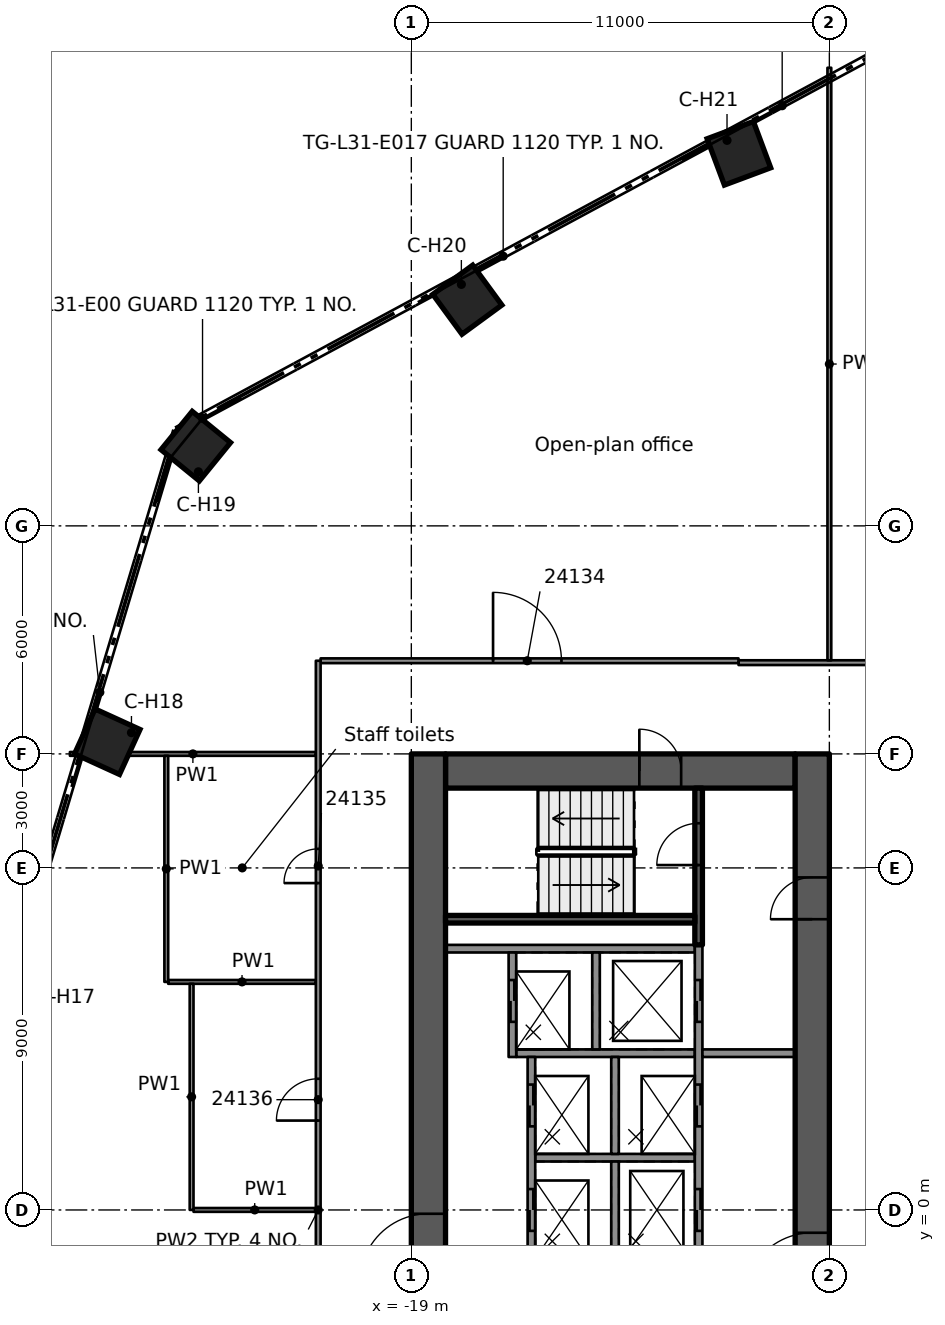
"""IFC4 building model, lengths in metres.
Left out: names, types, materials, properties, quantities, classifications, styles, units other than length and angle.
Written with IfcOpenShell. Run it as: python <this file> out.ifc"""

import sys

from ifc_helpers import new_model, si_unit, direction, frame, frame_2d, origin, origin_2d, place, context, subcontext, project, spatial, rectangle, extrude, element, fill, save


model = new_model("IFC4")
c1 = context("Model", 3, precision=1e-05, world=origin(), true_north=direction((0.0, 1.0)))
c2 = subcontext(c1, "Body", "Model", "MODEL_VIEW")
j1 = project(units=[si_unit("LENGTHUNIT", "METRE"), si_unit("PLANEANGLEUNIT", "RADIAN")], contexts=[c1])
p1 = place(None, origin())
s1 = spatial("IfcSite", under=j1, at=p1, CompositionType="ELEMENT")
p2 = place(p1, origin())
s2 = spatial("IfcBuilding", under=s1, at=p2, CompositionType="ELEMENT")
p3 = place(p2, frame((0.0, 0.0, 123.7)))
s3 = spatial("IfcBuildingStorey", under=s2, at=p3, CompositionType="ELEMENT", Elevation=123.7)
p4 = place(p3, frame((-18.1, 11.55, 0.0), z_axis=(0.0, 0.0, 1.0), x_axis=(1.0, 0.0, 0.0)))
e1 = element("IfcWall", 1, at=p4, inside=s3, PredefinedType="SHEAR", context=c2, shape_type="SweptSolid", body=[
    extrude(rectangle(XDim=9.2, YDim=0.9, at=frame_2d((4.6, 0.0))), origin(), (0.0, 0.0, 1.0), 3.5),
])
p5 = place(p4, frame((5.1, 0.0, 0.0)))
e2 = element("IfcOpeningElement", 2, at=p5, cuts=e1, PredefinedType="OPENING", context=c2, shape_type="SweptSolid", body=[
    extrude(rectangle(XDim=1.1, YDim=2.1, at=frame_2d((0.55, 1.05))), frame((0.0, 0.46, 0.0), z_axis=(0.0, -1.0, 0.0), x_axis=(1.0, 0.0, 0.0)), (0.0, 0.0, 1.0), 0.92),
])
p6 = place(p3, frame((-18.55, -12.0, 0.0), z_axis=(0.0, 0.0, 1.0), x_axis=(0.0, 1.0, 0.0)))
e3 = element("IfcWall", 3, at=p6, inside=s3, PredefinedType="SHEAR", context=c2, shape_type="SweptSolid", body=[
    extrude(rectangle(XDim=24.0, YDim=0.9, at=frame_2d((12.0, 0.0))), origin(), (0.0, 0.0, 1.0), 3.5),
])
p7 = place(p6, frame((10.1, 0.0, 0.0)))
e4 = element("IfcOpeningElement", 4, at=p7, cuts=e3, PredefinedType="OPENING", context=c2, shape_type="SweptSolid", body=[
    extrude(rectangle(XDim=1.8, YDim=2.1, at=frame_2d((0.9, 1.05))), frame((0.0, 0.46, 0.0), z_axis=(0.0, -1.0, 0.0), x_axis=(1.0, 0.0, 0.0)), (0.0, 0.0, 1.0), 0.92),
])
p8 = place(p3, frame((-8.45, -12.0, 0.0), z_axis=(0.0, 0.0, 1.0), x_axis=(0.0, 1.0, 0.0)))
e5 = element("IfcWall", 5, at=p8, inside=s3, PredefinedType="SHEAR", context=c2, shape_type="SweptSolid", body=[
    extrude(rectangle(XDim=24.0, YDim=0.9, at=frame_2d((12.0, 0.0))), origin(), (0.0, 0.0, 1.0), 3.5),
])
p9 = place(p8, frame((9.6, 0.0, 0.0)))
e6 = element("IfcOpeningElement", 6, at=p9, cuts=e5, PredefinedType="OPENING", context=c2, shape_type="SweptSolid", body=[
    extrude(rectangle(XDim=1.8, YDim=2.1, at=frame_2d((0.9, 1.05))), frame((0.0, 0.46, 0.0), z_axis=(0.0, -1.0, 0.0), x_axis=(1.0, 0.0, 0.0)), (0.0, 0.0, 1.0), 0.92),
])
p10 = place(p8, frame((19.65, 0.0, 0.0)))
e7 = element("IfcOpeningElement", 7, at=p10, cuts=e5, PredefinedType="OPENING", context=c2, shape_type="SweptSolid", body=[
    extrude(rectangle(XDim=1.1, YDim=2.1, at=frame_2d((0.55, 1.05))), frame((0.0, 0.46, 0.0), z_axis=(0.0, -1.0, 0.0), x_axis=(1.0, 0.0, 0.0)), (0.0, 0.0, 1.0), 0.92),
])
for number, where, z_axis, x_axis in (
    (8, (-27.001, 12.321, 0.0), (0.0, 0.0, 1.0), (-0.91, 0.415, 0.0)),
    (9, (-24.672, 20.098, 0.0), (0.0, 0.0, 1.0), (-0.775, 0.632, 0.0)),
    (10, (-17.526, 23.951, 0.0), (0.0, 0.0, 1.0), (-0.591, 0.807, 0.0)),
    (11, (-10.38, 27.804, 0.0), (0.0, 0.0, 1.0), (-0.35, 0.937, 0.0)),
):
    element("IfcColumn", number, at=place(p3, frame(where, z_axis=z_axis, x_axis=x_axis)), inside=s3, PredefinedType="COLUMN", context=c2, shape_type="SweptSolid", body=[
        extrude(rectangle(XDim=1.3, YDim=1.3, at=origin_2d()), origin(), (0.0, 0.0, 1.0), 3.5),
    ])
p11 = place(p3, frame((-11.54, 6.875, 0.0), z_axis=(0.0, 0.0, 1.0), x_axis=(-1.0, 0.0, 0.0)))
e12 = element("IfcWall", 12, at=p11, inside=s3, PredefinedType="SOLIDWALL", context=c2, shape_type="SweptSolid", body=[
    extrude(rectangle(XDim=6.56, YDim=0.2, at=frame_2d((3.28, 0.0))), origin(), (0.0, 0.0, 1.0), 3.09),
])
p12 = place(p3, frame((-11.54, 1.375, 0.0), z_axis=(0.0, 0.0, 1.0), x_axis=(-1.0, 0.0, 0.0)))
e13 = element("IfcWall", 13, at=p12, inside=s3, PredefinedType="SOLIDWALL", context=c2, shape_type="SweptSolid", body=[
    extrude(rectangle(XDim=4.2, YDim=0.2, at=frame_2d((2.1, 0.0))), origin(), (0.0, 0.0, 1.0), 3.09),
])
p13 = place(p3, frame((-11.54, 4.125, 0.0), z_axis=(0.0, 0.0, 1.0), x_axis=(-1.0, 0.0, 0.0)))
e14 = element("IfcWall", 14, at=p13, inside=s3, PredefinedType="SOLIDWALL", context=c2, shape_type="SweptSolid", body=[
    extrude(rectangle(XDim=4.7, YDim=0.2, at=frame_2d((2.35, 0.0))), origin(), (0.0, 0.0, 1.0), 3.09),
])
p14 = place(p3, frame((-11.44, -6.975, 0.0), z_axis=(0.0, 0.0, 1.0), x_axis=(0.0, 1.0, 0.0)))
e15 = element("IfcWall", 15, at=p14, inside=s3, PredefinedType="SOLIDWALL", context=c2, shape_type="SweptSolid", body=[
    extrude(rectangle(XDim=13.95, YDim=0.2, at=frame_2d((6.975, 0.0))), origin(), (0.0, 0.0, 1.0), 3.09),
])
p15 = place(p14, frame((6.425, 0.0, 0.0)))
e16 = element("IfcOpeningElement", 16, at=p15, cuts=e15, PredefinedType="OPENING", context=c2, shape_type="SweptSolid", body=[
    extrude(rectangle(XDim=1.1, YDim=2.1, at=frame_2d((0.55, 1.05))), frame((0.0, 0.11, 0.0), z_axis=(0.0, -1.0, 0.0), x_axis=(1.0, 0.0, 0.0)), (0.0, 0.0, 1.0), 0.22),
])
p16 = place(p14, frame((9.175, 0.0, 0.0)))
e17 = element("IfcOpeningElement", 17, at=p16, cuts=e15, PredefinedType="OPENING", context=c2, shape_type="SweptSolid", body=[
    extrude(rectangle(XDim=1.1, YDim=2.1, at=frame_2d((0.55, 1.05))), frame((0.0, 0.11, 0.0), z_axis=(0.0, -1.0, 0.0), x_axis=(1.0, 0.0, 0.0)), (0.0, 0.0, 1.0), 0.22),
])
p17 = place(p14, frame((11.925, 0.0, 0.0)))
e18 = element("IfcOpeningElement", 18, at=p17, cuts=e15, PredefinedType="OPENING", context=c2, shape_type="SweptSolid", body=[
    extrude(rectangle(XDim=1.1, YDim=2.1, at=frame_2d((0.55, 1.05))), frame((0.0, 0.11, 0.0), z_axis=(0.0, -1.0, 0.0), x_axis=(1.0, 0.0, 0.0)), (0.0, 0.0, 1.0), 0.22),
])
p18 = place(p14, frame((1.075, 0.0, 0.0)))
e19 = element("IfcOpeningElement", 19, at=p18, cuts=e15, PredefinedType="OPENING", context=c2, shape_type="SweptSolid", body=[
    extrude(rectangle(XDim=0.8, YDim=2.1, at=frame_2d((0.4, 1.05))), frame((0.0, 0.11, 0.0), z_axis=(0.0, -1.0, 0.0), x_axis=(1.0, 0.0, 0.0)), (0.0, 0.0, 1.0), 0.22),
])
for number, where, z_axis, x_axis in (
    (20, (-13.64, -1.275, 0.0), (0.0, 0.0, 1.0), (0.0, 1.0, 0.0)),
    (21, (-13.64, 1.475, 0.0), (0.0, 0.0, 1.0), (0.0, 1.0, 0.0)),
    (22, (-14.14, 4.225, 0.0), (0.0, 0.0, 1.0), (0.0, 1.0, 0.0)),
):
    element("IfcWall", number, at=place(p3, frame(where, z_axis=z_axis, x_axis=x_axis)), inside=s3, PredefinedType="SOLIDWALL", context=c2, shape_type="SweptSolid", body=[
        extrude(rectangle(XDim=2.55, YDim=0.2, at=frame_2d((1.275, 0.0))), origin(), (0.0, 0.0, 1.0), 3.09),
    ])
p19 = place(p3, frame((-15.84, -4.025, 0.0), z_axis=(0.0, 0.0, 1.0), x_axis=(0.0, 1.0, 0.0)))
e23 = element("IfcWall", 23, at=p19, inside=s3, PredefinedType="SOLIDWALL", context=c2, shape_type="SweptSolid", body=[
    extrude(rectangle(XDim=8.05, YDim=0.2, at=frame_2d((4.025, 0.0))), origin(), (0.0, 0.0, 1.0), 3.09),
])
p20 = place(p19, frame((3.475, 0.0, 0.0)))
e24 = element("IfcOpeningElement", 24, at=p20, cuts=e23, PredefinedType="OPENING", context=c2, shape_type="SweptSolid", body=[
    extrude(rectangle(XDim=1.1, YDim=2.1, at=frame_2d((0.55, 1.05))), frame((0.0, 0.11, 0.0), z_axis=(0.0, -1.0, 0.0), x_axis=(1.0, 0.0, 0.0)), (0.0, 0.0, 1.0), 0.22),
])
p21 = place(p19, frame((6.225, 0.0, 0.0)))
e25 = element("IfcOpeningElement", 25, at=p21, cuts=e23, PredefinedType="OPENING", context=c2, shape_type="SweptSolid", body=[
    extrude(rectangle(XDim=1.1, YDim=2.1, at=frame_2d((0.55, 1.05))), frame((0.0, 0.11, 0.0), z_axis=(0.0, -1.0, 0.0), x_axis=(1.0, 0.0, 0.0)), (0.0, 0.0, 1.0), 0.22),
])
p22 = place(p3, frame((-16.34, 4.025, 0.0), z_axis=(0.0, 0.0, 1.0), x_axis=(0.0, 1.0, 0.0)))
e26 = element("IfcWall", 26, at=p22, inside=s3, PredefinedType="SOLIDWALL", context=c2, shape_type="SweptSolid", body=[
    extrude(rectangle(XDim=2.75, YDim=0.2, at=frame_2d((1.375, 0.0))), origin(), (0.0, 0.0, 1.0), 3.09),
])
p23 = place(p22, frame((0.925, 0.0, 0.0)))
e27 = element("IfcOpeningElement", 27, at=p23, cuts=e26, PredefinedType="OPENING", context=c2, shape_type="SweptSolid", body=[
    extrude(rectangle(XDim=1.1, YDim=2.1, at=frame_2d((0.55, 1.05))), frame((0.0, 0.11, 0.0), z_axis=(0.0, -1.0, 0.0), x_axis=(1.0, 0.0, 0.0)), (0.0, 0.0, 1.0), 0.22),
])
p24 = place(p3, frame((-11.44, 6.975, 0.0), z_axis=(0.0, 0.0, 1.0), x_axis=(0.0, 1.0, 0.0)))
e28 = element("IfcWall", 28, at=p24, inside=s3, PredefinedType="SOLIDWALL", context=c2, shape_type="SweptSolid", body=[
    extrude(rectangle(XDim=4.125, YDim=0.2, at=frame_2d((2.062, 0.0))), origin(), (0.0, 0.0, 1.0), 3.09),
])
p25 = place(p24, frame((2.1, 0.0, 0.0)))
e29 = element("IfcOpeningElement", 29, at=p25, cuts=e28, PredefinedType="OPENING", context=c2, shape_type="SweptSolid", body=[
    extrude(rectangle(XDim=1.1, YDim=2.1, at=frame_2d((0.55, 1.05))), frame((0.0, 0.11, 0.0), z_axis=(0.0, -1.0, 0.0), x_axis=(1.0, 0.0, 0.0)), (0.0, 0.0, 1.0), 0.22),
])
p26 = place(p3, frame((-11.54, 7.65, 0.0), z_axis=(0.0, 0.0, 1.0), x_axis=(-1.0, 0.0, 0.0)))
e30 = element("IfcWall", 30, at=p26, inside=s3, PredefinedType="SOLIDWALL", context=c2, shape_type="SweptSolid", body=[
    extrude(rectangle(XDim=6.56, YDim=0.2, at=frame_2d((3.28, 0.0))), origin(), (0.0, 0.0, 1.0), 3.09),
])
p27 = place(p3, frame((-8.9, 4.125, 0.0), z_axis=(0.0, 0.0, 1.0), x_axis=(-1.0, 0.0, 0.0)))
e31 = element("IfcWall", 31, at=p27, inside=s3, PredefinedType="PARTITIONING", context=c2, shape_type="SweptSolid", body=[
    extrude(rectangle(XDim=2.44, YDim=0.2, at=frame_2d((1.22, 0.0))), origin(), (0.0, 0.0, 1.0), 3.09),
])
p28 = place(p3, frame((-24.731, 0.001, 0.0), z_axis=(0.0, 0.0, 1.0), x_axis=(1.0, 0.0, 0.0)))
e32 = element("IfcWall", 32, at=p28, inside=s3, PredefinedType="PARTITIONING", context=c2, shape_type="SweptSolid", body=[
    extrude(rectangle(XDim=3.219, YDim=0.1, at=frame_2d((1.609, 0.0))), origin(), (0.0, 0.0, 1.0), 3.08),
])
p29 = place(p3, frame((-25.398, 6.001, 0.0), z_axis=(0.0, 0.0, 1.0), x_axis=(1.0, 0.0, 0.0)))
e33 = element("IfcWall", 33, at=p29, inside=s3, PredefinedType="PARTITIONING", context=c2, shape_type="SweptSolid", body=[
    extrude(rectangle(XDim=3.886, YDim=0.1, at=frame_2d((1.943, 0.0))), origin(), (0.0, 0.0, 1.0), 3.08),
])
p30 = place(p3, frame((-27.984, 12.0, 0.0), z_axis=(0.0, 0.0, 1.0), x_axis=(1.0, 0.0, 0.0)))
e34 = element("IfcWall", 34, at=p30, inside=s3, PredefinedType="PARTITIONING", context=c2, shape_type="SweptSolid", body=[
    extrude(rectangle(XDim=6.472, YDim=0.1, at=frame_2d((3.236, 0.0))), origin(), (0.0, 0.0, 1.0), 3.08),
])
p31 = place(p3, frame((-10.39, 14.401, 0.0), z_axis=(0.0, 0.0, 1.0), x_axis=(1.0, 0.0, 0.0)))
e35 = element("IfcWall", 35, at=p31, inside=s3, PredefinedType="PARTITIONING", context=c2, shape_type="SweptSolid", body=[
    extrude(rectangle(XDim=20.781, YDim=0.125, at=frame_2d((10.391, 0.0))), origin(), (0.0, 0.0, 1.0), 3.08),
])
p32 = place(p31, frame((18.99, 0.0, 0.0)))
e36 = element("IfcOpeningElement", 36, at=p32, cuts=e35, PredefinedType="OPENING", context=c2, shape_type="SweptSolid", body=[
    extrude(rectangle(XDim=1.1, YDim=2.1, at=frame_2d((0.55, 1.05))), frame((0.0, 0.073, 0.0), z_axis=(0.0, -1.0, 0.0), x_axis=(1.0, 0.0, 0.0)), (0.0, 0.0, 1.0), 0.145),
])
p33 = place(p31, frame((13.49, 0.0, 0.0)))
e37 = element("IfcOpeningElement", 37, at=p33, cuts=e35, PredefinedType="OPENING", context=c2, shape_type="SweptSolid", body=[
    extrude(rectangle(XDim=1.8, YDim=2.1, at=frame_2d((0.9, 1.05))), frame((0.0, 0.073, 0.0), z_axis=(0.0, -1.0, 0.0), x_axis=(1.0, 0.0, 0.0)), (0.0, 0.0, 1.0), 0.145),
])
p34 = place(p31, frame((5.49, 0.0, 0.0)))
e38 = element("IfcOpeningElement", 38, at=p34, cuts=e35, PredefinedType="OPENING", context=c2, shape_type="SweptSolid", body=[
    extrude(rectangle(XDim=1.8, YDim=2.1, at=frame_2d((0.9, 1.05))), frame((0.0, 0.073, 0.0), z_axis=(0.0, -1.0, 0.0), x_axis=(1.0, 0.0, 0.0)), (0.0, 0.0, 1.0), 0.145),
])
p35 = place(p3, frame((-21.387, 14.451, 0.0), z_axis=(0.0, 0.0, 1.0), x_axis=(1.0, 0.0, 0.0)))
e39 = element("IfcWall", 39, at=p35, inside=s3, PredefinedType="PARTITIONING", context=c2, shape_type="SweptSolid", body=[
    extrude(rectangle(XDim=10.996, YDim=0.125, at=frame_2d((5.498, 0.0))), origin(), (0.0, 0.0, 1.0), 3.08),
])
p36 = place(p35, frame((4.538, 0.0, 0.0)))
e40 = element("IfcOpeningElement", 40, at=p36, cuts=e39, PredefinedType="OPENING", context=c2, shape_type="SweptSolid", body=[
    extrude(rectangle(XDim=1.8, YDim=2.1, at=frame_2d((0.9, 1.05))), frame((0.0, 0.073, 0.0), z_axis=(0.0, -1.0, 0.0), x_axis=(1.0, 0.0, 0.0)), (0.0, 0.0, 1.0), 0.145),
])
p37 = place(p3, frame((-8.0, 14.463, 0.0), z_axis=(0.0, 0.0, 1.0), x_axis=(0.0, 1.0, 0.0)))
e41 = element("IfcWall", 41, at=p37, inside=s3, PredefinedType="PARTITIONING", context=c2, shape_type="SweptSolid", body=[
    extrude(rectangle(XDim=15.591, YDim=0.1, at=frame_2d((7.795, 0.0))), origin(), (0.0, 0.0, 1.0), 3.08),
])
p38 = place(p3, frame((-21.45, -14.451, 0.0), z_axis=(0.0, 0.0, 1.0), x_axis=(0.0, 1.0, 0.0)))
e42 = element("IfcWall", 42, at=p38, inside=s3, PredefinedType="PARTITIONING", context=c2, shape_type="SweptSolid", body=[
    extrude(rectangle(XDim=28.902, YDim=0.125, at=frame_2d((14.451, 0.0))), origin(), (0.0, 0.0, 1.0), 3.08),
])
p39 = place(p38, frame((8.051, 0.0, 0.0)))
e43 = element("IfcOpeningElement", 43, at=p39, cuts=e42, PredefinedType="OPENING", context=c2, shape_type="SweptSolid", body=[
    extrude(rectangle(XDim=0.9, YDim=2.1, at=frame_2d((0.45, 1.05))), frame((0.0, 0.073, 0.0), z_axis=(0.0, -1.0, 0.0), x_axis=(1.0, 0.0, 0.0)), (0.0, 0.0, 1.0), 0.145),
])
p40 = place(p38, frame((23.052, 0.0, 0.0)))
e44 = element("IfcOpeningElement", 44, at=p40, cuts=e42, PredefinedType="OPENING", context=c2, shape_type="SweptSolid", body=[
    extrude(rectangle(XDim=0.9, YDim=2.1, at=frame_2d((0.45, 1.05))), frame((0.0, 0.073, 0.0), z_axis=(0.0, -1.0, 0.0), x_axis=(1.0, 0.0, 0.0)), (0.0, 0.0, 1.0), 0.145),
])
p41 = place(p38, frame((16.803, 0.0, 0.0)))
e45 = element("IfcOpeningElement", 45, at=p41, cuts=e42, PredefinedType="OPENING", context=c2, shape_type="SweptSolid", body=[
    extrude(rectangle(XDim=1.1, YDim=2.1, at=frame_2d((0.55, 1.05))), frame((0.0, 0.073, 0.0), z_axis=(0.0, -1.0, 0.0), x_axis=(1.0, 0.0, 0.0)), (0.0, 0.0, 1.0), 0.145),
])
for number, where, z_axis, x_axis in (
    (46, (-24.782, 0.002, 0.0), (0.0, 0.0, 1.0), (0.0, 1.0, 0.0)),
    (47, (-25.448, 6.001, 0.0), (0.0, 0.0, 1.0), (0.0, 1.0, 0.0)),
):
    element("IfcWall", number, at=place(p3, frame(where, z_axis=z_axis, x_axis=x_axis)), inside=s3, PredefinedType="PARTITIONING", context=c2, shape_type="SweptSolid", body=[
        extrude(rectangle(XDim=5.949, YDim=0.1, at=frame_2d((2.975, 0.0))), origin(), (0.0, 0.0, 1.0), 3.08),
    ])
p42 = place(p15, origin())
e48 = element("IfcDoor", 48, at=p42, inside=s3, OperationType="DOUBLE_DOOR_SLIDING", PredefinedType="DOOR", context=c2, shape_type="SweptSolid", body=[
    extrude(rectangle(XDim=1.1, YDim=2.1, at=frame_2d((0.55, 1.05))), frame((0.0, 0.025, 0.0), z_axis=(0.0, -1.0, 0.0), x_axis=(1.0, 0.0, 0.0)), (0.0, 0.0, 1.0), 0.05),
])
fill(e16, e48)
p43 = place(p20, origin())
e49 = element("IfcDoor", 49, at=p43, inside=s3, OperationType="DOUBLE_DOOR_SLIDING", PredefinedType="DOOR", context=c2, shape_type="SweptSolid", body=[
    extrude(rectangle(XDim=1.1, YDim=2.1, at=frame_2d((0.55, 1.05))), frame((0.0, 0.025, 0.0), z_axis=(0.0, -1.0, 0.0), x_axis=(1.0, 0.0, 0.0)), (0.0, 0.0, 1.0), 0.05),
])
fill(e24, e49)
p44 = place(p16, origin())
e50 = element("IfcDoor", 50, at=p44, inside=s3, OperationType="DOUBLE_DOOR_SLIDING", PredefinedType="DOOR", context=c2, shape_type="SweptSolid", body=[
    extrude(rectangle(XDim=1.1, YDim=2.1, at=frame_2d((0.55, 1.05))), frame((0.0, 0.025, 0.0), z_axis=(0.0, -1.0, 0.0), x_axis=(1.0, 0.0, 0.0)), (0.0, 0.0, 1.0), 0.05),
])
fill(e17, e50)
p45 = place(p21, origin())
e51 = element("IfcDoor", 51, at=p45, inside=s3, OperationType="DOUBLE_DOOR_SLIDING", PredefinedType="DOOR", context=c2, shape_type="SweptSolid", body=[
    extrude(rectangle(XDim=1.1, YDim=2.1, at=frame_2d((0.55, 1.05))), frame((0.0, 0.025, 0.0), z_axis=(0.0, -1.0, 0.0), x_axis=(1.0, 0.0, 0.0)), (0.0, 0.0, 1.0), 0.05),
])
fill(e25, e51)
p46 = place(p17, origin())
e52 = element("IfcDoor", 52, at=p46, inside=s3, OperationType="DOUBLE_DOOR_SLIDING", PredefinedType="DOOR", context=c2, shape_type="SweptSolid", body=[
    extrude(rectangle(XDim=1.1, YDim=2.1, at=frame_2d((0.55, 1.05))), frame((0.0, 0.025, 0.0), z_axis=(0.0, -1.0, 0.0), x_axis=(1.0, 0.0, 0.0)), (0.0, 0.0, 1.0), 0.05),
])
fill(e18, e52)
p47 = place(p23, origin())
e53 = element("IfcDoor", 53, at=p47, inside=s3, OperationType="DOUBLE_DOOR_SLIDING", PredefinedType="DOOR", context=c2, shape_type="SweptSolid", body=[
    extrude(rectangle(XDim=1.1, YDim=2.1, at=frame_2d((0.55, 1.05))), frame((0.0, 0.025, 0.0), z_axis=(0.0, -1.0, 0.0), x_axis=(1.0, 0.0, 0.0)), (0.0, 0.0, 1.0), 0.05),
])
fill(e27, e53)
p48 = place(p9, origin())
e54 = element("IfcDoor", 54, at=p48, inside=s3, OperationType="SINGLE_SWING_LEFT", PredefinedType="DOOR", context=c2, shape_type="SweptSolid", body=[
    extrude(rectangle(XDim=1.8, YDim=2.1, at=frame_2d((0.9, 1.05))), frame((0.0, 0.025, 0.0), z_axis=(0.0, -1.0, 0.0), x_axis=(1.0, 0.0, 0.0)), (0.0, 0.0, 1.0), 0.05),
])
fill(e6, e54)
p49 = place(p7, origin())
e55 = element("IfcDoor", 55, at=p49, inside=s3, OperationType="SINGLE_SWING_LEFT", PredefinedType="DOOR", context=c2, shape_type="SweptSolid", body=[
    extrude(rectangle(XDim=1.8, YDim=2.1, at=frame_2d((0.9, 1.05))), frame((0.0, 0.025, 0.0), z_axis=(0.0, -1.0, 0.0), x_axis=(1.0, 0.0, 0.0)), (0.0, 0.0, 1.0), 0.05),
])
fill(e4, e55)
p50 = place(p10, origin())
e56 = element("IfcDoor", 56, at=p50, inside=s3, OperationType="SINGLE_SWING_RIGHT", PredefinedType="DOOR", context=c2, shape_type="SweptSolid", body=[
    extrude(rectangle(XDim=1.1, YDim=2.1, at=frame_2d((0.55, 1.05))), frame((0.0, 0.025, 0.0), z_axis=(0.0, -1.0, 0.0), x_axis=(1.0, 0.0, 0.0)), (0.0, 0.0, 1.0), 0.05),
])
fill(e7, e56)
p51 = place(p5, origin())
e57 = element("IfcDoor", 57, at=p51, inside=s3, OperationType="SINGLE_SWING_RIGHT", PredefinedType="DOOR", context=c2, shape_type="SweptSolid", body=[
    extrude(rectangle(XDim=1.1, YDim=2.1, at=frame_2d((0.55, 1.05))), frame((0.0, 0.025, 0.0), z_axis=(0.0, -1.0, 0.0), x_axis=(1.0, 0.0, 0.0)), (0.0, 0.0, 1.0), 0.05),
])
fill(e2, e57)
p52 = place(p25, origin())
e58 = element("IfcDoor", 58, at=p52, inside=s3, OperationType="SINGLE_SWING_RIGHT", PredefinedType="DOOR", context=c2, shape_type="SweptSolid", body=[
    extrude(rectangle(XDim=1.1, YDim=2.1, at=frame_2d((0.55, 1.05))), frame((0.0, 0.025, 0.0), z_axis=(0.0, -1.0, 0.0), x_axis=(1.0, 0.0, 0.0)), (0.0, 0.0, 1.0), 0.05),
])
fill(e29, e58)
p53 = place(p36, origin())
e59 = element("IfcDoor", 59, at=p53, inside=s3, OperationType="DOUBLE_DOOR_SINGLE_SWING", PredefinedType="DOOR", context=c2, shape_type="SweptSolid", body=[
    extrude(rectangle(XDim=1.8, YDim=2.1, at=frame_2d((0.9, 1.05))), frame((0.0, 0.025, 0.0), z_axis=(0.0, -1.0, 0.0), x_axis=(1.0, 0.0, 0.0)), (0.0, 0.0, 1.0), 0.05),
])
fill(e40, e59)
p54 = place(p40, origin())
e60 = element("IfcDoor", 60, at=p54, inside=s3, OperationType="SINGLE_SWING_RIGHT", PredefinedType="DOOR", context=c2, shape_type="SweptSolid", body=[
    extrude(rectangle(XDim=0.9, YDim=2.1, at=frame_2d((0.45, 1.05))), frame((0.0, 0.025, 0.0), z_axis=(0.0, -1.0, 0.0), x_axis=(1.0, 0.0, 0.0)), (0.0, 0.0, 1.0), 0.05),
])
fill(e44, e60)
p55 = place(p41, origin())
e61 = element("IfcDoor", 61, at=p55, inside=s3, OperationType="SINGLE_SWING_RIGHT", PredefinedType="DOOR", context=c2, shape_type="SweptSolid", body=[
    extrude(rectangle(XDim=1.1, YDim=2.1, at=frame_2d((0.55, 1.05))), frame((0.0, 0.025, 0.0), z_axis=(0.0, -1.0, 0.0), x_axis=(1.0, 0.0, 0.0)), (0.0, 0.0, 1.0), 0.05),
])
fill(e45, e61)
save(model, sys.argv[1])
